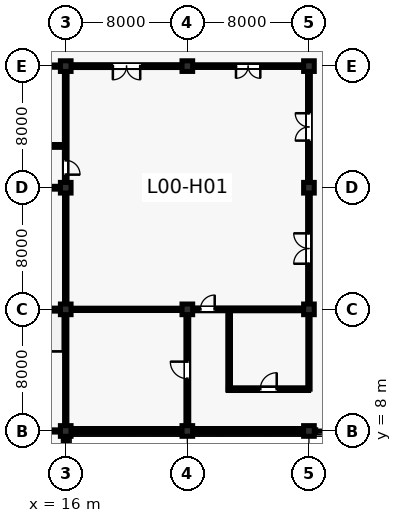
"""IFC4 building model, lengths in metres.
Left out: names, types, materials, properties, quantities, classifications, styles, units other than length and angle.
Written with IfcOpenShell. Run it as: python <this file> out.ifc"""

import sys

from ifc_helpers import new_model, si_unit, direction, frame, frame_2d, origin, origin_2d, place, context, subcontext, project, spatial, rectangle, extrude, element, fill, save


model = new_model("IFC4")
c1 = context("Model", 3, precision=1e-05, world=origin(), true_north=direction((0.0, 1.0)))
c2 = subcontext(c1, "Body", "Model", "MODEL_VIEW")
j1 = project(units=[si_unit("LENGTHUNIT", "METRE"), si_unit("PLANEANGLEUNIT", "RADIAN")], contexts=[c1])
p1 = place(None, origin())
s1 = spatial("IfcSite", under=j1, at=p1, CompositionType="ELEMENT")
p2 = place(p1, origin())
s2 = spatial("IfcBuilding", under=s1, at=p2, CompositionType="ELEMENT")
p3 = place(p2, origin())
s3 = spatial("IfcBuildingStorey", under=s2, at=p3, CompositionType="ELEMENT", Elevation=0.0)
for number, where, z_axis, x_axis in (
    (1, (16.0, 8.0, 0.0), (0.0, 0.0, 1.0), (1.0, 0.0, 0.0)),
    (2, (16.0, 16.0, 0.0), (0.0, 0.0, 1.0), (1.0, 0.0, 0.0)),
    (3, (16.0, 24.0, 0.0), (0.0, 0.0, 1.0), (1.0, 0.0, 0.0)),
    (4, (16.0, 32.0, 0.0), (0.0, 0.0, 1.0), (1.0, 0.0, 0.0)),
    (5, (24.0, 8.0, 0.0), (0.0, 0.0, 1.0), (1.0, 0.0, 0.0)),
    (6, (24.0, 16.0, 0.0), (0.0, 0.0, 1.0), (1.0, 0.0, 0.0)),
    (7, (24.0, 32.0, 0.0), (0.0, 0.0, 1.0), (1.0, 0.0, 0.0)),
    (8, (32.0, 8.0, 0.0), (0.0, 0.0, 1.0), (1.0, 0.0, 0.0)),
    (9, (32.0, 16.0, 0.0), (0.0, 0.0, 1.0), (1.0, 0.0, 0.0)),
    (10, (32.0, 24.0, 0.0), (0.0, 0.0, 1.0), (1.0, 0.0, 0.0)),
    (11, (32.0, 32.0, 0.0), (0.0, 0.0, 1.0), (1.0, 0.0, 0.0)),
):
    element("IfcColumn", number, at=place(p3, frame(where, z_axis=z_axis, x_axis=x_axis)), inside=s3, PredefinedType="COLUMN", context=c2, shape_type="SweptSolid", body=[
        extrude(rectangle(XDim=0.7, YDim=0.7, at=origin_2d()), origin(), (0.0, 0.0, 1.0), 5.28),
    ])
p4 = place(p3, frame((16.0, 0.335, 0.0), z_axis=(0.0, 0.0, 1.0), x_axis=(0.0, 1.0, 0.0)))
e12 = element("IfcWall", 12, at=p4, inside=s3, PredefinedType="SOLIDWALL", context=c2, shape_type="SweptSolid", body=[
    extrude(rectangle(XDim=7.33, YDim=0.32, at=frame_2d((3.665, 0.0))), origin(), (0.0, 0.0, 1.0), 4.614),
])
p5 = place(p4, frame((2.59, 0.0, 0.9)))
e13 = element("IfcOpeningElement", 13, at=p5, cuts=e12, PredefinedType="OPENING", context=c2, shape_type="SweptSolid", body=[
    extrude(rectangle(XDim=2.15, YDim=2.8, at=frame_2d((1.075, 1.4))), frame((0.0, 0.17, 0.0), z_axis=(0.0, -1.0, 0.0), x_axis=(1.0, 0.0, 0.0)), (0.0, 0.0, 1.0), 0.34),
])
p6 = place(p3, frame((16.335, 8.0, 0.0), z_axis=(0.0, 0.0, 1.0), x_axis=(1.0, 0.0, 0.0)))
e14 = element("IfcWall", 14, at=p6, inside=s3, PredefinedType="SOLIDWALL", context=c2, shape_type="SweptSolid", body=[
    extrude(rectangle(XDim=7.33, YDim=0.32, at=frame_2d((3.665, 0.0))), origin(), (0.0, 0.0, 1.0), 4.677),
])
p7 = place(p6, frame((2.515, 0.0, 0.9)))
e15 = element("IfcOpeningElement", 15, at=p7, cuts=e14, PredefinedType="OPENING", context=c2, shape_type="SweptSolid", body=[
    extrude(rectangle(XDim=2.3, YDim=2.55, at=frame_2d((1.15, 1.275))), frame((0.0, 0.17, 0.0), z_axis=(0.0, -1.0, 0.0), x_axis=(1.0, 0.0, 0.0)), (0.0, 0.0, 1.0), 0.34),
])
p8 = place(p3, frame((24.335, 8.0, 0.0), z_axis=(0.0, 0.0, 1.0), x_axis=(1.0, 0.0, 0.0)))
e16 = element("IfcWall", 16, at=p8, inside=s3, PredefinedType="SOLIDWALL", context=c2, shape_type="SweptSolid", body=[
    extrude(rectangle(XDim=7.33, YDim=0.32, at=frame_2d((3.665, 0.0))), origin(), (0.0, 0.0, 1.0), 4.61),
])
p9 = place(p8, frame((0.719, 0.0, 0.95)))
e17 = element("IfcOpeningElement", 17, at=p9, cuts=e16, PredefinedType="OPENING", context=c2, shape_type="SweptSolid", body=[
    extrude(rectangle(XDim=1.2, YDim=1.8, at=frame_2d((0.6, 0.9))), frame((0.0, 0.17, 0.0), z_axis=(0.0, -1.0, 0.0), x_axis=(1.0, 0.0, 0.0)), (0.0, 0.0, 1.0), 0.34),
])
p10 = place(p8, frame((5.411, 0.0, 0.95)))
e18 = element("IfcOpeningElement", 18, at=p10, cuts=e16, PredefinedType="OPENING", context=c2, shape_type="SweptSolid", body=[
    extrude(rectangle(XDim=1.2, YDim=1.8, at=frame_2d((0.6, 0.9))), frame((0.0, 0.17, 0.0), z_axis=(0.0, -1.0, 0.0), x_axis=(1.0, 0.0, 0.0)), (0.0, 0.0, 1.0), 0.34),
])
p11 = place(p3, frame((10.7, 26.75, 0.0), z_axis=(0.0, 0.0, 1.0), x_axis=(1.0, 0.0, 0.0)))
e19 = element("IfcWall", 19, at=p11, inside=s3, PredefinedType="PARTITIONING", context=c2, shape_type="SweptSolid", body=[
    extrude(rectangle(XDim=5.28, YDim=0.185, at=frame_2d((2.64, 0.0))), origin(), (0.0, 0.0, 1.0), 4.667),
])
p12 = place(p11, frame((2.12, 0.0, 0.0)))
e20 = element("IfcOpeningElement", 20, at=p12, cuts=e19, PredefinedType="OPENING", context=c2, shape_type="SweptSolid", body=[
    extrude(rectangle(XDim=1.04, YDim=2.18, at=frame_2d((0.52, 1.09))), frame((0.0, 0.103, 0.0), z_axis=(0.0, -1.0, 0.0), x_axis=(1.0, 0.0, 0.0)), (0.0, 0.0, 1.0), 0.205),
])
p13 = place(p3, frame((10.75, 32.0, 0.0), z_axis=(0.0, 0.0, 1.0), x_axis=(1.0, 0.0, 0.0)))
e21 = element("IfcWall", 21, at=p13, inside=s3, PredefinedType="PARTITIONING", context=c2, shape_type="SweptSolid", body=[
    extrude(rectangle(XDim=4.89, YDim=0.15, at=frame_2d((2.445, 0.0))), origin(), (0.0, 0.0, 1.0), 4.403),
])
p14 = place(p3, frame((26.7, 10.75, 0.0), z_axis=(0.0, 0.0, 1.0), x_axis=(1.0, 0.0, 0.0)))
e22 = element("IfcWall", 22, at=p14, inside=s3, PredefinedType="PARTITIONING", context=c2, shape_type="SweptSolid", body=[
    extrude(rectangle(XDim=5.28, YDim=0.175, at=frame_2d((2.64, 0.0))), origin(), (0.0, 0.0, 1.0), 4.412),
])
p15 = place(p14, frame((2.1, 0.0, 0.0)))
e23 = element("IfcOpeningElement", 23, at=p15, cuts=e22, PredefinedType="OPENING", context=c2, shape_type="SweptSolid", body=[
    extrude(rectangle(XDim=1.08, YDim=2.2, at=frame_2d((0.54, 1.1))), frame((0.0, 0.097, 0.0), z_axis=(0.0, -1.0, 0.0), x_axis=(1.0, 0.0, 0.0)), (0.0, 0.0, 1.0), 0.195),
])
p16 = place(p3, frame((26.75, 10.7, 0.0), z_axis=(0.0, 0.0, 1.0), x_axis=(0.0, 1.0, 0.0)))
e24 = element("IfcWall", 24, at=p16, inside=s3, PredefinedType="PARTITIONING", context=c2, shape_type="SweptSolid", body=[
    extrude(rectangle(XDim=5.28, YDim=0.175, at=frame_2d((2.64, 0.0))), origin(), (0.0, 0.0, 1.0), 4.667),
])
p17 = place(p3, frame((32.0, 10.75, 0.0), z_axis=(0.0, 0.0, 1.0), x_axis=(0.0, 1.0, 0.0)))
e25 = element("IfcWall", 25, at=p17, inside=s3, PredefinedType="PARTITIONING", context=c2, shape_type="SweptSolid", body=[
    extrude(rectangle(XDim=4.89, YDim=0.15, at=frame_2d((2.445, 0.0))), origin(), (0.0, 0.0, 1.0), 4.412),
])
p18 = place(p3, frame((8.34, 8.0, 0.0), z_axis=(0.0, 0.0, 1.0), x_axis=(1.0, 0.0, 0.0)))
e26 = element("IfcWall", 26, at=p18, inside=s3, PredefinedType="PARTITIONING", context=c2, shape_type="SweptSolid", body=[
    extrude(rectangle(XDim=7.32, YDim=0.142, at=frame_2d((3.66, 0.0))), origin(), (0.0, 0.0, 1.0), 4.336),
])
p19 = place(p3, frame((16.0, 8.34, 0.0), z_axis=(0.0, 0.0, 1.0), x_axis=(0.0, 1.0, 0.0)))
e27 = element("IfcWall", 27, at=p19, inside=s3, PredefinedType="PARTITIONING", context=c2, shape_type="SweptSolid", body=[
    extrude(rectangle(XDim=7.32, YDim=0.15, at=frame_2d((3.66, 0.0))), origin(), (0.0, 0.0, 1.0), 4.471),
])
p20 = place(p3, frame((8.39, 16.0, 0.0), z_axis=(0.0, 0.0, 1.0), x_axis=(1.0, 0.0, 0.0)))
e28 = element("IfcWall", 28, at=p20, inside=s3, PredefinedType="PARTITIONING", context=c2, shape_type="SweptSolid", body=[
    extrude(rectangle(XDim=7.27, YDim=0.16, at=frame_2d((3.635, 0.0))), origin(), (0.0, 0.0, 1.0), 4.404),
])
p21 = place(p3, frame((16.0, 16.34, 0.0), z_axis=(0.0, 0.0, 1.0), x_axis=(0.0, 1.0, 0.0)))
e29 = element("IfcWall", 29, at=p21, inside=s3, PredefinedType="PARTITIONING", context=c2, shape_type="SweptSolid", body=[
    extrude(rectangle(XDim=7.32, YDim=0.16, at=frame_2d((3.66, 0.0))), origin(), (0.0, 0.0, 1.0), 4.603),
])
p22 = place(p3, frame((8.39, 24.0, 0.0), z_axis=(0.0, 0.0, 1.0), x_axis=(1.0, 0.0, 0.0)))
e30 = element("IfcWall", 30, at=p22, inside=s3, PredefinedType="PARTITIONING", context=c2, shape_type="SweptSolid", body=[
    extrude(rectangle(XDim=7.27, YDim=0.185, at=frame_2d((3.635, 0.0))), origin(), (0.0, 0.0, 1.0), 4.327),
])
p23 = place(p22, frame((1.343, 0.0, 0.0)))
e31 = element("IfcOpeningElement", 31, at=p23, cuts=e30, PredefinedType="OPENING", context=c2, shape_type="SweptSolid", body=[
    extrude(rectangle(XDim=0.95, YDim=2.1, at=frame_2d((0.475, 1.05))), frame((0.0, 0.103, 0.0), z_axis=(0.0, -1.0, 0.0), x_axis=(1.0, 0.0, 0.0)), (0.0, 0.0, 1.0), 0.205),
])
p24 = place(p22, frame((5.341, 0.0, 0.0)))
e32 = element("IfcOpeningElement", 32, at=p24, cuts=e30, PredefinedType="OPENING", context=c2, shape_type="SweptSolid", body=[
    extrude(rectangle(XDim=0.95, YDim=2.1, at=frame_2d((0.475, 1.05))), frame((0.0, 0.103, 0.0), z_axis=(0.0, -1.0, 0.0), x_axis=(1.0, 0.0, 0.0)), (0.0, 0.0, 1.0), 0.205),
])
p25 = place(p3, frame((16.0, 24.34, 0.0), z_axis=(0.0, 0.0, 1.0), x_axis=(0.0, 1.0, 0.0)))
e33 = element("IfcWall", 33, at=p25, inside=s3, PredefinedType="PARTITIONING", context=c2, shape_type="SweptSolid", body=[
    extrude(rectangle(XDim=7.32, YDim=0.175, at=frame_2d((3.66, 0.0))), origin(), (0.0, 0.0, 1.0), 4.667),
])
p26 = place(p25, frame((0.52, 0.0, 0.0)))
e34 = element("IfcOpeningElement", 34, at=p26, cuts=e33, PredefinedType="OPENING", context=c2, shape_type="SweptSolid", body=[
    extrude(rectangle(XDim=0.94, YDim=2.12, at=frame_2d((0.47, 1.06))), frame((0.0, 0.097, 0.0), z_axis=(0.0, -1.0, 0.0), x_axis=(1.0, 0.0, 0.0)), (0.0, 0.0, 1.0), 0.195),
])
p27 = place(p3, frame((24.0, 8.34, 0.0), z_axis=(0.0, 0.0, 1.0), x_axis=(0.0, 1.0, 0.0)))
e35 = element("IfcWall", 35, at=p27, inside=s3, PredefinedType="PARTITIONING", context=c2, shape_type="SweptSolid", body=[
    extrude(rectangle(XDim=7.32, YDim=0.185, at=frame_2d((3.66, 0.0))), origin(), (0.0, 0.0, 1.0), 4.403),
])
p28 = place(p27, frame((3.1, 0.0, 0.0)))
e36 = element("IfcOpeningElement", 36, at=p28, cuts=e35, PredefinedType="OPENING", context=c2, shape_type="SweptSolid", body=[
    extrude(rectangle(XDim=1.12, YDim=2.22, at=frame_2d((0.56, 1.11))), frame((0.0, 0.103, 0.0), z_axis=(0.0, -1.0, 0.0), x_axis=(1.0, 0.0, 0.0)), (0.0, 0.0, 1.0), 0.205),
])
p29 = place(p3, frame((16.34, 16.0, 0.0), z_axis=(0.0, 0.0, 1.0), x_axis=(1.0, 0.0, 0.0)))
e37 = element("IfcWall", 37, at=p29, inside=s3, PredefinedType="PARTITIONING", context=c2, shape_type="SweptSolid", body=[
    extrude(rectangle(XDim=7.32, YDim=0.15, at=frame_2d((3.66, 0.0))), origin(), (0.0, 0.0, 1.0), 4.603),
])
p30 = place(p3, frame((16.34, 32.0, 0.0), z_axis=(0.0, 0.0, 1.0), x_axis=(1.0, 0.0, 0.0)))
e38 = element("IfcWall", 38, at=p30, inside=s3, PredefinedType="PARTITIONING", context=c2, shape_type="SweptSolid", body=[
    extrude(rectangle(XDim=7.32, YDim=0.185, at=frame_2d((3.66, 0.0))), origin(), (0.0, 0.0, 1.0), 4.607),
])
p31 = place(p30, frame((2.76, 0.0, 0.0)))
e39 = element("IfcOpeningElement", 39, at=p31, cuts=e38, PredefinedType="OPENING", context=c2, shape_type="SweptSolid", body=[
    extrude(rectangle(XDim=1.8, YDim=2.35, at=frame_2d((0.9, 1.175))), frame((0.0, 0.103, 0.0), z_axis=(0.0, -1.0, 0.0), x_axis=(1.0, 0.0, 0.0)), (0.0, 0.0, 1.0), 0.205),
])
p32 = place(p3, frame((24.34, 16.0, 0.0), z_axis=(0.0, 0.0, 1.0), x_axis=(1.0, 0.0, 0.0)))
e40 = element("IfcWall", 40, at=p32, inside=s3, PredefinedType="PARTITIONING", context=c2, shape_type="SweptSolid", body=[
    extrude(rectangle(XDim=7.32, YDim=0.185, at=frame_2d((3.66, 0.0))), origin(), (0.0, 0.0, 1.0), 4.667),
])
p33 = place(p32, frame((0.52, 0.0, 0.0)))
e41 = element("IfcOpeningElement", 41, at=p33, cuts=e40, PredefinedType="OPENING", context=c2, shape_type="SweptSolid", body=[
    extrude(rectangle(XDim=0.94, YDim=2.12, at=frame_2d((0.47, 1.06))), frame((0.0, 0.103, 0.0), z_axis=(0.0, -1.0, 0.0), x_axis=(1.0, 0.0, 0.0)), (0.0, 0.0, 1.0), 0.205),
])
p34 = place(p3, frame((32.0, 16.34, 0.0), z_axis=(0.0, 0.0, 1.0), x_axis=(0.0, 1.0, 0.0)))
e42 = element("IfcWall", 42, at=p34, inside=s3, PredefinedType="PARTITIONING", context=c2, shape_type="SweptSolid", body=[
    extrude(rectangle(XDim=7.32, YDim=0.175, at=frame_2d((3.66, 0.0))), origin(), (0.0, 0.0, 1.0), 4.607),
])
p35 = place(p34, frame((2.66, 0.0, 0.0)))
e43 = element("IfcOpeningElement", 43, at=p35, cuts=e42, PredefinedType="OPENING", context=c2, shape_type="SweptSolid", body=[
    extrude(rectangle(XDim=2.0, YDim=2.4, at=frame_2d((1.0, 1.2))), frame((0.0, 0.097, 0.0), z_axis=(0.0, -1.0, 0.0), x_axis=(1.0, 0.0, 0.0)), (0.0, 0.0, 1.0), 0.195),
])
p36 = place(p3, frame((32.0, 24.34, 0.0), z_axis=(0.0, 0.0, 1.0), x_axis=(0.0, 1.0, 0.0)))
e44 = element("IfcWall", 44, at=p36, inside=s3, PredefinedType="PARTITIONING", context=c2, shape_type="SweptSolid", body=[
    extrude(rectangle(XDim=7.32, YDim=0.185, at=frame_2d((3.66, 0.0))), origin(), (0.0, 0.0, 1.0), 4.67),
])
p37 = place(p36, frame((2.76, 0.0, 0.0)))
e45 = element("IfcOpeningElement", 45, at=p37, cuts=e44, PredefinedType="OPENING", context=c2, shape_type="SweptSolid", body=[
    extrude(rectangle(XDim=1.8, YDim=2.35, at=frame_2d((0.9, 1.175))), frame((0.0, 0.103, 0.0), z_axis=(0.0, -1.0, 0.0), x_axis=(1.0, 0.0, 0.0)), (0.0, 0.0, 1.0), 0.205),
])
p38 = place(p3, frame((24.34, 32.0, 0.0), z_axis=(0.0, 0.0, 1.0), x_axis=(1.0, 0.0, 0.0)))
e46 = element("IfcWall", 46, at=p38, inside=s3, PredefinedType="PARTITIONING", context=c2, shape_type="SweptSolid", body=[
    extrude(rectangle(XDim=7.32, YDim=0.175, at=frame_2d((3.66, 0.0))), origin(), (0.0, 0.0, 1.0), 4.67),
])
p39 = place(p38, frame((2.86, 0.0, 0.0)))
e47 = element("IfcOpeningElement", 47, at=p39, cuts=e46, PredefinedType="OPENING", context=c2, shape_type="SweptSolid", body=[
    extrude(rectangle(XDim=1.6, YDim=2.25, at=frame_2d((0.8, 1.125))), frame((0.0, 0.097, 0.0), z_axis=(0.0, -1.0, 0.0), x_axis=(1.0, 0.0, 0.0)), (0.0, 0.0, 1.0), 0.195),
])
p40 = place(p7, origin())
e48 = element("IfcWindow", 48, at=p40, inside=s3, PartitioningType="SINGLE_PANEL", PredefinedType="WINDOW", context=c2, shape_type="SweptSolid", body=[
    extrude(rectangle(XDim=2.3, YDim=2.55, at=frame_2d((1.15, 1.275))), frame((0.0, 0.03, 0.0), z_axis=(0.0, -1.0, 0.0), x_axis=(1.0, 0.0, 0.0)), (0.0, 0.0, 1.0), 0.06),
])
fill(e15, e48)
p41 = place(p9, origin())
e49 = element("IfcWindow", 49, at=p41, inside=s3, PartitioningType="SINGLE_PANEL", PredefinedType="WINDOW", context=c2, shape_type="SweptSolid", body=[
    extrude(rectangle(XDim=1.2, YDim=1.8, at=frame_2d((0.6, 0.9))), frame((0.0, 0.03, 0.0), z_axis=(0.0, -1.0, 0.0), x_axis=(1.0, 0.0, 0.0)), (0.0, 0.0, 1.0), 0.06),
])
fill(e17, e49)
p42 = place(p10, origin())
e50 = element("IfcWindow", 50, at=p42, inside=s3, PartitioningType="SINGLE_PANEL", PredefinedType="WINDOW", context=c2, shape_type="SweptSolid", body=[
    extrude(rectangle(XDim=1.2, YDim=1.8, at=frame_2d((0.6, 0.9))), frame((0.0, 0.03, 0.0), z_axis=(0.0, -1.0, 0.0), x_axis=(1.0, 0.0, 0.0)), (0.0, 0.0, 1.0), 0.06),
])
fill(e18, e50)
p43 = place(p15, origin())
e51 = element("IfcDoor", 51, at=p43, inside=s3, OperationType="SINGLE_SWING_RIGHT", PredefinedType="DOOR", context=c2, shape_type="SweptSolid", body=[
    extrude(rectangle(XDim=1.08, YDim=2.2, at=frame_2d((0.54, 1.1))), frame((0.0, 0.025, 0.0), z_axis=(0.0, -1.0, 0.0), x_axis=(1.0, 0.0, 0.0)), (0.0, 0.0, 1.0), 0.05),
])
fill(e23, e51)
p44 = place(p26, frame((0.94, 0.0, 0.0), z_axis=(0.0, 0.0, 1.0), x_axis=(-1.0, 0.0, 0.0)))
e52 = element("IfcDoor", 52, at=p44, inside=s3, OperationType="SINGLE_SWING_LEFT", PredefinedType="DOOR", context=c2, shape_type="SweptSolid", body=[
    extrude(rectangle(XDim=0.94, YDim=2.12, at=frame_2d((0.47, 1.06))), frame((0.0, 0.025, 0.0), z_axis=(0.0, -1.0, 0.0), x_axis=(1.0, 0.0, 0.0)), (0.0, 0.0, 1.0), 0.05),
])
fill(e34, e52)
p45 = place(p28, origin())
e53 = element("IfcDoor", 53, at=p45, inside=s3, OperationType="SINGLE_SWING_RIGHT", PredefinedType="DOOR", context=c2, shape_type="SweptSolid", body=[
    extrude(rectangle(XDim=1.12, YDim=2.22, at=frame_2d((0.56, 1.11))), frame((0.0, 0.025, 0.0), z_axis=(0.0, -1.0, 0.0), x_axis=(1.0, 0.0, 0.0)), (0.0, 0.0, 1.0), 0.05),
])
fill(e36, e53)
p46 = place(p31, frame((1.8, 0.0, 0.0), z_axis=(0.0, 0.0, 1.0), x_axis=(-1.0, 0.0, 0.0)))
e54 = element("IfcDoor", 54, at=p46, inside=s3, OperationType="DOUBLE_DOOR_SINGLE_SWING", PredefinedType="DOOR", context=c2, shape_type="SweptSolid", body=[
    extrude(rectangle(XDim=1.8, YDim=2.35, at=frame_2d((0.9, 1.175))), frame((0.0, 0.025, 0.0), z_axis=(0.0, -1.0, 0.0), x_axis=(1.0, 0.0, 0.0)), (0.0, 0.0, 1.0), 0.05),
])
fill(e39, e54)
p47 = place(p33, origin())
e55 = element("IfcDoor", 55, at=p47, inside=s3, OperationType="SINGLE_SWING_RIGHT", PredefinedType="DOOR", context=c2, shape_type="SweptSolid", body=[
    extrude(rectangle(XDim=0.94, YDim=2.12, at=frame_2d((0.47, 1.06))), frame((0.0, 0.025, 0.0), z_axis=(0.0, -1.0, 0.0), x_axis=(1.0, 0.0, 0.0)), (0.0, 0.0, 1.0), 0.05),
])
fill(e41, e55)
p48 = place(p35, origin())
e56 = element("IfcDoor", 56, at=p48, inside=s3, OperationType="DOUBLE_DOOR_SINGLE_SWING", PredefinedType="DOOR", context=c2, shape_type="SweptSolid", body=[
    extrude(rectangle(XDim=2.0, YDim=2.4, at=frame_2d((1.0, 1.2))), frame((0.0, 0.025, 0.0), z_axis=(0.0, -1.0, 0.0), x_axis=(1.0, 0.0, 0.0)), (0.0, 0.0, 1.0), 0.05),
])
fill(e43, e56)
p49 = place(p37, origin())
e57 = element("IfcDoor", 57, at=p49, inside=s3, OperationType="DOUBLE_DOOR_SINGLE_SWING", PredefinedType="DOOR", context=c2, shape_type="SweptSolid", body=[
    extrude(rectangle(XDim=1.8, YDim=2.35, at=frame_2d((0.9, 1.175))), frame((0.0, 0.025, 0.0), z_axis=(0.0, -1.0, 0.0), x_axis=(1.0, 0.0, 0.0)), (0.0, 0.0, 1.0), 0.05),
])
fill(e45, e57)
p50 = place(p39, frame((1.6, 0.0, 0.0), z_axis=(0.0, 0.0, 1.0), x_axis=(-1.0, 0.0, 0.0)))
e58 = element("IfcDoor", 58, at=p50, inside=s3, OperationType="DOUBLE_DOOR_SINGLE_SWING", PredefinedType="DOOR", context=c2, shape_type="SweptSolid", body=[
    extrude(rectangle(XDim=1.6, YDim=2.25, at=frame_2d((0.8, 1.125))), frame((0.0, 0.025, 0.0), z_axis=(0.0, -1.0, 0.0), x_axis=(1.0, 0.0, 0.0)), (0.0, 0.0, 1.0), 0.05),
])
fill(e47, e58)
save(model, sys.argv[1])
